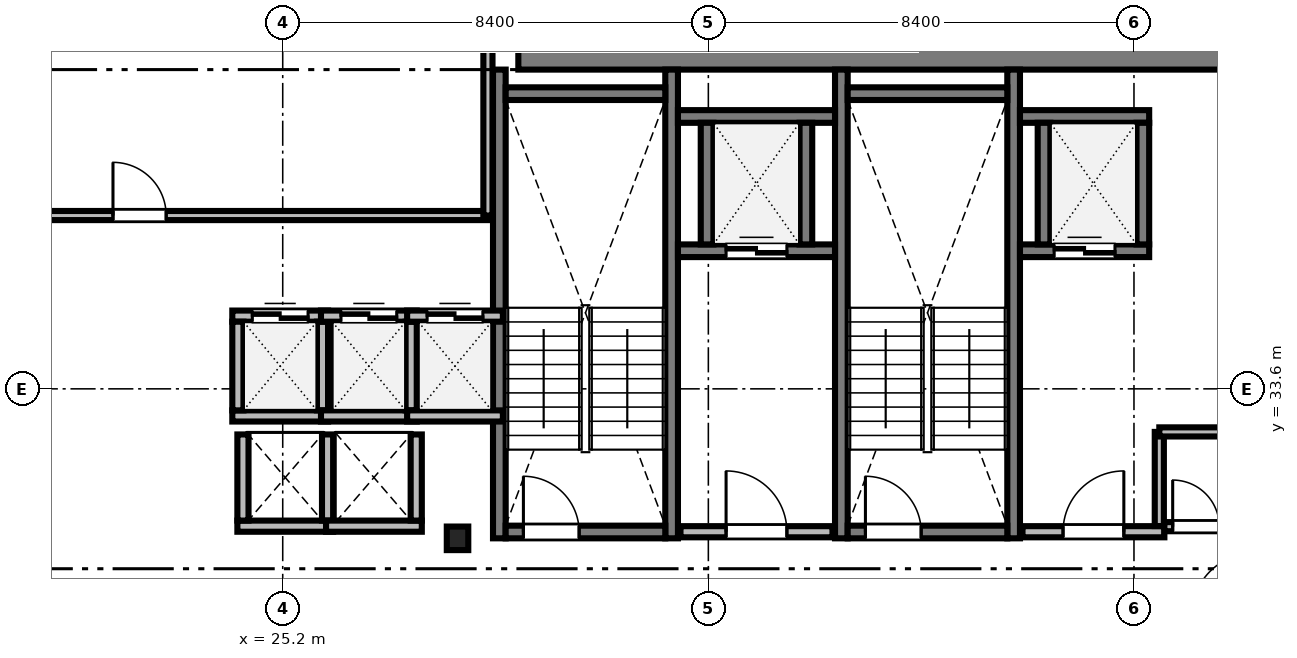
"""IFC4 building model, lengths in metres.
Left out: names, types, materials, properties, quantities, classifications, styles, units other than length and angle.
Written with IfcOpenShell. Run it as: python <this file> out.ifc"""

import sys

from ifc_helpers import new_model, si_unit, direction, frame, frame_2d, origin, origin_2d, place, context, subcontext, project, spatial, rectangle, i_section, extrude, source, transform, mapped, element, fill, save


model = new_model("IFC4")
c1 = context("Model", 3, precision=1e-05, world=origin(), true_north=direction((0.0, 1.0)))
c2 = subcontext(c1, "Body", "Model", "MODEL_VIEW")
j1 = project(units=[si_unit("LENGTHUNIT", "METRE"), si_unit("PLANEANGLEUNIT", "RADIAN")], contexts=[c1])
p1 = place(None, origin())
s1 = spatial("IfcSite", under=j1, at=p1, CompositionType="ELEMENT")
p2 = place(p1, origin())
s2 = spatial("IfcBuilding", under=s1, at=p2, CompositionType="ELEMENT")
p3 = place(p2, frame((0.0, 0.0, 126.1)))
s3 = spatial("IfcBuildingStorey", under=s2, at=p3, CompositionType="ELEMENT", Elevation=126.1)
m1 = source(origin(), c2, "Body", "SweptSolid", [
    extrude(rectangle(XDim=17.52, YDim=0.8, at=frame_2d((8.76, 0.0))), origin(), (0.0, 0.0, 1.0), 3.46),
])
p4 = place(p3, frame((29.85, 40.3, 0.0), z_axis=(0.0, 0.0, 1.0), x_axis=(1.0, 0.0, 0.0)))
e1 = element("IfcWall", 1, at=p4, inside=s3, PredefinedType="SHEAR", context=c2, shape_type="MappedRepresentation", body=[
    mapped(m1, transform((0.0, 0.0, 0.0), scale=1.0)),
])
m2 = source(origin(), c2, "Body", "SweptSolid", [
    extrude(i_section(OverallWidth=0.424, OverallDepth=0.465, WebThickness=0.035, FlangeThickness=0.056, FilletRadius=0.015, at=origin_2d()), origin(), (0.0, 0.0, 1.0), 3.46),
])
p5 = place(p3, frame((28.65, 30.65, 0.0), z_axis=(0.0, 0.0, 1.0), x_axis=(1.0, 0.0, 0.0)))
e2 = element("IfcColumn", 2, at=p5, inside=s3, PredefinedType="COLUMN", context=c2, shape_type="MappedRepresentation", body=[
    mapped(m2, transform((0.0, 0.0, 0.0), scale=1.0)),
])
m3 = source(origin(), c2, "Body", "SweptSolid", [
    extrude(rectangle(XDim=9.25, YDim=0.25, at=frame_2d((4.625, 0.0))), origin(), (0.0, 0.0, 1.0), 3.5),
])
for number, where, z_axis, x_axis in (
    (3, (29.475, 30.65, 0.0), (0.0, 0.0, 1.0), (0.0, 1.0, 0.0)),
    (4, (32.875, 30.65, 0.0), (0.0, 0.0, 1.0), (0.0, 1.0, 0.0)),
):
    element("IfcWall", number, at=place(p3, frame(where, z_axis=z_axis, x_axis=x_axis)), inside=s3, PredefinedType="SOLIDWALL", context=c2, shape_type="MappedRepresentation", body=[
        mapped(m3, transform((0.0, 0.0, 0.0), scale=1.0)),
    ])
m4 = source(origin(), c2, "Body", "SweptSolid", [
    extrude(rectangle(XDim=3.15, YDim=0.25, at=frame_2d((1.575, 0.0))), origin(), (0.0, 0.0, 1.0), 3.5),
])
p6 = place(p3, frame((29.6, 39.425, 0.0), z_axis=(0.0, 0.0, 1.0), x_axis=(1.0, 0.0, 0.0)))
e5 = element("IfcWall", 5, at=p6, inside=s3, PredefinedType="SOLIDWALL", context=c2, shape_type="MappedRepresentation", body=[
    mapped(m4, transform((0.0, 0.0, 0.0), scale=1.0)),
])
p7 = place(p3, frame((29.6, 30.775, 0.0), z_axis=(0.0, 0.0, 1.0), x_axis=(1.0, 0.0, 0.0)))
e6 = element("IfcWall", 6, at=p7, inside=s3, PredefinedType="SOLIDWALL", context=c2, shape_type="MappedRepresentation", body=[
    mapped(m4, transform((0.0, 0.0, 0.0), scale=1.0)),
])
m5 = source(origin(), c2, "Body", "SweptSolid", [
    extrude(rectangle(XDim=1.1, YDim=2.2, at=frame_2d((0.55, 1.1))), frame((0.0, 0.135, 0.0), z_axis=(0.0, -1.0, 0.0), x_axis=(1.0, 0.0, 0.0)), (0.0, 0.0, 1.0), 0.27),
])
p8 = place(p7, frame((0.35, 0.0, 0.0)))
e7 = element("IfcOpeningElement", 7, at=p8, cuts=e6, PredefinedType="OPENING", context=c2, shape_type="MappedRepresentation", body=[
    mapped(m5, transform((0.0, 0.0, 0.0), scale=1.0)),
])
for number, where, z_axis, x_axis in (
    (8, (36.225, 30.65, 0.0), (0.0, 0.0, 1.0), (0.0, 1.0, 0.0)),
    (9, (39.625, 30.65, 0.0), (0.0, 0.0, 1.0), (0.0, 1.0, 0.0)),
):
    element("IfcWall", number, at=place(p3, frame(where, z_axis=z_axis, x_axis=x_axis)), inside=s3, PredefinedType="SOLIDWALL", context=c2, shape_type="MappedRepresentation", body=[
        mapped(m3, transform((0.0, 0.0, 0.0), scale=1.0)),
    ])
p9 = place(p3, frame((36.35, 39.425, 0.0), z_axis=(0.0, 0.0, 1.0), x_axis=(1.0, 0.0, 0.0)))
e10 = element("IfcWall", 10, at=p9, inside=s3, PredefinedType="SOLIDWALL", context=c2, shape_type="MappedRepresentation", body=[
    mapped(m4, transform((0.0, 0.0, 0.0), scale=1.0)),
])
p10 = place(p3, frame((36.35, 30.775, 0.0), z_axis=(0.0, 0.0, 1.0), x_axis=(1.0, 0.0, 0.0)))
e11 = element("IfcWall", 11, at=p10, inside=s3, PredefinedType="SOLIDWALL", context=c2, shape_type="MappedRepresentation", body=[
    mapped(m4, transform((0.0, 0.0, 0.0), scale=1.0)),
])
p11 = place(p10, frame((0.35, 0.0, 0.0)))
e12 = element("IfcOpeningElement", 12, at=p11, cuts=e11, PredefinedType="OPENING", context=c2, shape_type="MappedRepresentation", body=[
    mapped(m5, transform((0.0, 0.0, 0.0), scale=1.0)),
])
m6 = source(origin(), c2, "Body", "SweptSolid", [
    extrude(rectangle(XDim=3.0, YDim=0.22, at=frame_2d((1.5, 0.0))), origin(), (0.0, 0.0, 1.0), 3.46),
])
p12 = place(p3, frame((33.05, 30.78, 0.0), z_axis=(0.0, 0.0, 1.0), x_axis=(1.0, 0.0, 0.0)))
e13 = element("IfcWall", 13, at=p12, inside=s3, PredefinedType="SOLIDWALL", context=c2, shape_type="MappedRepresentation", body=[
    mapped(m6, transform((0.0, 0.0, 0.0), scale=1.0)),
])
m7 = source(origin(), c2, "Body", "SweptSolid", [
    extrude(rectangle(XDim=1.2, YDim=2.2, at=frame_2d((0.6, 1.1))), frame((0.0, 0.12, 0.0), z_axis=(0.0, -1.0, 0.0), x_axis=(1.0, 0.0, 0.0)), (0.0, 0.0, 1.0), 0.24),
])
p13 = place(p12, frame((0.9, 0.0, 0.0)))
e14 = element("IfcOpeningElement", 14, at=p13, cuts=e13, PredefinedType="OPENING", context=c2, shape_type="MappedRepresentation", body=[
    mapped(m7, transform((0.0, 0.0, 0.0), scale=1.0)),
])
m8 = source(origin(), c2, "Body", "SweptSolid", [
    extrude(rectangle(XDim=2.8, YDim=0.22, at=frame_2d((1.4, 0.0))), origin(), (0.0, 0.0, 1.0), 3.46),
])
p14 = place(p3, frame((39.8, 30.78, 0.0), z_axis=(0.0, 0.0, 1.0), x_axis=(1.0, 0.0, 0.0)))
e15 = element("IfcWall", 15, at=p14, inside=s3, PredefinedType="SOLIDWALL", context=c2, shape_type="MappedRepresentation", body=[
    mapped(m8, transform((0.0, 0.0, 0.0), scale=1.0)),
])
p15 = place(p14, frame((0.8, 0.0, 0.0)))
e16 = element("IfcOpeningElement", 16, at=p15, cuts=e15, PredefinedType="OPENING", context=c2, shape_type="MappedRepresentation", body=[
    mapped(m7, transform((0.0, 0.0, 0.0), scale=1.0)),
])
m9 = source(origin(), c2, "Body", "SweptSolid", [
    extrude(rectangle(XDim=1.89, YDim=0.22, at=frame_2d((0.945, 0.0))), origin(), (0.0, 0.0, 1.0), 3.46),
])
p16 = place(p3, frame((24.205, 33.065, 0.0), z_axis=(0.0, 0.0, 1.0), x_axis=(1.0, 0.0, 0.0)))
e17 = element("IfcWall", 17, at=p16, inside=s3, PredefinedType="SOLIDWALL", context=c2, shape_type="MappedRepresentation", body=[
    mapped(m9, transform((0.0, 0.0, 0.0), scale=1.0)),
])
p17 = place(p3, frame((24.205, 35.035, 0.0), z_axis=(0.0, 0.0, 1.0), x_axis=(1.0, 0.0, 0.0)))
e18 = element("IfcWall", 18, at=p17, inside=s3, PredefinedType="SOLIDWALL", context=c2, shape_type="MappedRepresentation", body=[
    mapped(m9, transform((0.0, 0.0, 0.0), scale=1.0)),
])
m10 = source(origin(), c2, "Body", "SweptSolid", [
    extrude(rectangle(XDim=1.1, YDim=2.2, at=frame_2d((0.55, 1.1))), frame((0.0, 0.12, 0.0), z_axis=(0.0, -1.0, 0.0), x_axis=(1.0, 0.0, 0.0)), (0.0, 0.0, 1.0), 0.24),
])
p18 = place(p17, frame((0.395, 0.0, 0.0)))
e19 = element("IfcOpeningElement", 19, at=p18, cuts=e18, PredefinedType="OPENING", context=c2, shape_type="MappedRepresentation", body=[
    mapped(m10, transform((0.0, 0.0, 0.0), scale=1.0)),
])
m11 = source(origin(), c2, "Body", "SweptSolid", [
    extrude(rectangle(XDim=1.75, YDim=0.22, at=frame_2d((0.875, 0.0))), origin(), (0.0, 0.0, 1.0), 3.46),
])
for number, where, z_axis, x_axis in (
    (20, (24.315, 33.175, 0.0), (0.0, 0.0, 1.0), (0.0, 1.0, 0.0)),
    (21, (25.985, 33.175, 0.0), (0.0, 0.0, 1.0), (0.0, 1.0, 0.0)),
):
    element("IfcWall", number, at=place(p3, frame(where, z_axis=z_axis, x_axis=x_axis)), inside=s3, PredefinedType="SOLIDWALL", context=c2, shape_type="MappedRepresentation", body=[
        mapped(m11, transform((0.0, 0.0, 0.0), scale=1.0)),
    ])
p19 = place(p3, frame((25.955, 33.065, 0.0), z_axis=(0.0, 0.0, 1.0), x_axis=(1.0, 0.0, 0.0)))
e22 = element("IfcWall", 22, at=p19, inside=s3, PredefinedType="SOLIDWALL", context=c2, shape_type="MappedRepresentation", body=[
    mapped(m9, transform((0.0, 0.0, 0.0), scale=1.0)),
])
p20 = place(p3, frame((25.955, 35.035, 0.0), z_axis=(0.0, 0.0, 1.0), x_axis=(1.0, 0.0, 0.0)))
e23 = element("IfcWall", 23, at=p20, inside=s3, PredefinedType="SOLIDWALL", context=c2, shape_type="MappedRepresentation", body=[
    mapped(m9, transform((0.0, 0.0, 0.0), scale=1.0)),
])
p21 = place(p20, frame((0.395, 0.0, 0.0)))
e24 = element("IfcOpeningElement", 24, at=p21, cuts=e23, PredefinedType="OPENING", context=c2, shape_type="MappedRepresentation", body=[
    mapped(m10, transform((0.0, 0.0, 0.0), scale=1.0)),
])
p22 = place(p3, frame((27.735, 33.175, 0.0), z_axis=(0.0, 0.0, 1.0), x_axis=(0.0, 1.0, 0.0)))
e25 = element("IfcWall", 25, at=p22, inside=s3, PredefinedType="SOLIDWALL", context=c2, shape_type="MappedRepresentation", body=[
    mapped(m11, transform((0.0, 0.0, 0.0), scale=1.0)),
])
p23 = place(p3, frame((27.655, 33.065, 0.0), z_axis=(0.0, 0.0, 1.0), x_axis=(1.0, 0.0, 0.0)))
e26 = element("IfcWall", 26, at=p23, inside=s3, PredefinedType="SOLIDWALL", context=c2, shape_type="MappedRepresentation", body=[
    mapped(m9, transform((0.0, 0.0, 0.0), scale=1.0)),
])
p24 = place(p3, frame((27.655, 35.035, 0.0), z_axis=(0.0, 0.0, 1.0), x_axis=(1.0, 0.0, 0.0)))
e27 = element("IfcWall", 27, at=p24, inside=s3, PredefinedType="SOLIDWALL", context=c2, shape_type="MappedRepresentation", body=[
    mapped(m9, transform((0.0, 0.0, 0.0), scale=1.0)),
])
p25 = place(p24, frame((0.395, 0.0, 0.0)))
e28 = element("IfcOpeningElement", 28, at=p25, cuts=e27, PredefinedType="OPENING", context=c2, shape_type="MappedRepresentation", body=[
    mapped(m10, transform((0.0, 0.0, 0.0), scale=1.0)),
])
m12 = source(origin(), c2, "Body", "SweptSolid", [
    extrude(rectangle(XDim=3.1, YDim=0.25, at=frame_2d((1.55, 0.0))), origin(), (0.0, 0.0, 1.0), 3.46),
])
p26 = place(p3, frame((33.0, 36.325, 0.0), z_axis=(0.0, 0.0, 1.0), x_axis=(1.0, 0.0, 0.0)))
e29 = element("IfcWall", 29, at=p26, inside=s3, PredefinedType="SOLIDWALL", context=c2, shape_type="MappedRepresentation", body=[
    mapped(m12, transform((0.0, 0.0, 0.0), scale=1.0)),
])
m13 = source(origin(), c2, "Body", "SweptSolid", [
    extrude(rectangle(XDim=1.2, YDim=2.25, at=frame_2d((0.6, 1.125))), frame((0.0, 0.135, 0.0), z_axis=(0.0, -1.0, 0.0), x_axis=(1.0, 0.0, 0.0)), (0.0, 0.0, 1.0), 0.27),
])
p27 = place(p26, frame((0.95, 0.0, 0.0)))
e30 = element("IfcOpeningElement", 30, at=p27, cuts=e29, PredefinedType="OPENING", context=c2, shape_type="MappedRepresentation", body=[
    mapped(m13, transform((0.0, 0.0, 0.0), scale=1.0)),
])
p28 = place(p3, frame((33.0, 38.975, 0.0), z_axis=(0.0, 0.0, 1.0), x_axis=(1.0, 0.0, 0.0)))
e31 = element("IfcWall", 31, at=p28, inside=s3, PredefinedType="SOLIDWALL", context=c2, shape_type="MappedRepresentation", body=[
    mapped(m12, transform((0.0, 0.0, 0.0), scale=1.0)),
])
m14 = source(origin(), c2, "Body", "SweptSolid", [
    extrude(rectangle(XDim=2.4, YDim=0.25, at=frame_2d((1.2, 0.0))), origin(), (0.0, 0.0, 1.0), 3.46),
])
for number, where, z_axis, x_axis in (
    (32, (33.575, 36.45, 0.0), (0.0, 0.0, 1.0), (0.0, 1.0, 0.0)),
    (33, (35.525, 36.45, 0.0), (0.0, 0.0, 1.0), (0.0, 1.0, 0.0)),
):
    element("IfcWall", number, at=place(p3, frame(where, z_axis=z_axis, x_axis=x_axis)), inside=s3, PredefinedType="SOLIDWALL", context=c2, shape_type="MappedRepresentation", body=[
        mapped(m14, transform((0.0, 0.0, 0.0), scale=1.0)),
    ])
m15 = source(origin(), c2, "Body", "SweptSolid", [
    extrude(rectangle(XDim=2.55, YDim=0.25, at=frame_2d((1.275, 0.0))), origin(), (0.0, 0.0, 1.0), 3.46),
])
p29 = place(p3, frame((39.75, 36.325, 0.0), z_axis=(0.0, 0.0, 1.0), x_axis=(1.0, 0.0, 0.0)))
e34 = element("IfcWall", 34, at=p29, inside=s3, PredefinedType="SOLIDWALL", context=c2, shape_type="MappedRepresentation", body=[
    mapped(m15, transform((0.0, 0.0, 0.0), scale=1.0)),
])
p30 = place(p29, frame((0.675, 0.0, 0.0)))
e35 = element("IfcOpeningElement", 35, at=p30, cuts=e34, PredefinedType="OPENING", context=c2, shape_type="MappedRepresentation", body=[
    mapped(m13, transform((0.0, 0.0, 0.0), scale=1.0)),
])
p31 = place(p3, frame((39.75, 38.975, 0.0), z_axis=(0.0, 0.0, 1.0), x_axis=(1.0, 0.0, 0.0)))
e36 = element("IfcWall", 36, at=p31, inside=s3, PredefinedType="SOLIDWALL", context=c2, shape_type="MappedRepresentation", body=[
    mapped(m15, transform((0.0, 0.0, 0.0), scale=1.0)),
])
for number, where, z_axis, x_axis in (
    (37, (40.225, 36.45, 0.0), (0.0, 0.0, 1.0), (0.0, 1.0, 0.0)),
    (38, (42.175, 36.45, 0.0), (0.0, 0.0, 1.0), (0.0, 1.0, 0.0)),
):
    element("IfcWall", number, at=place(p3, frame(where, z_axis=z_axis, x_axis=x_axis)), inside=s3, PredefinedType="SOLIDWALL", context=c2, shape_type="MappedRepresentation", body=[
        mapped(m14, transform((0.0, 0.0, 0.0), scale=1.0)),
    ])
m16 = source(origin(), c2, "Body", "SweptSolid", [
    extrude(rectangle(XDim=1.89, YDim=0.22, at=frame_2d((0.945, 0.0))), origin(), (0.0, 0.0, 1.0), 3.46),
])
p32 = place(p3, frame((24.305, 30.89, 0.0), z_axis=(0.0, 0.0, 1.0), x_axis=(1.0, 0.0, 0.0)))
e39 = element("IfcWall", 39, at=p32, inside=s3, PredefinedType="SOLIDWALL", context=c2, shape_type="MappedRepresentation", body=[
    mapped(m16, transform((0.0, 0.0, 0.0), scale=1.0)),
])
m17 = source(origin(), c2, "Body", "SweptSolid", [
    extrude(rectangle(XDim=1.7, YDim=0.22, at=frame_2d((0.85, 0.0))), origin(), (0.0, 0.0, 1.0), 3.46),
])
for number, where, z_axis, x_axis in (
    (40, (24.415, 31.0, 0.0), (0.0, 0.0, 1.0), (0.0, 1.0, 0.0)),
    (41, (26.085, 31.0, 0.0), (0.0, 0.0, 1.0), (0.0, 1.0, 0.0)),
):
    element("IfcWall", number, at=place(p3, frame(where, z_axis=z_axis, x_axis=x_axis)), inside=s3, PredefinedType="SOLIDWALL", context=c2, shape_type="MappedRepresentation", body=[
        mapped(m17, transform((0.0, 0.0, 0.0), scale=1.0)),
    ])
p33 = place(p3, frame((26.055, 30.89, 0.0), z_axis=(0.0, 0.0, 1.0), x_axis=(1.0, 0.0, 0.0)))
e42 = element("IfcWall", 42, at=p33, inside=s3, PredefinedType="SOLIDWALL", context=c2, shape_type="MappedRepresentation", body=[
    mapped(m16, transform((0.0, 0.0, 0.0), scale=1.0)),
])
p34 = place(p3, frame((27.835, 31.0, 0.0), z_axis=(0.0, 0.0, 1.0), x_axis=(0.0, 1.0, 0.0)))
e43 = element("IfcWall", 43, at=p34, inside=s3, PredefinedType="SOLIDWALL", context=c2, shape_type="MappedRepresentation", body=[
    mapped(m17, transform((0.0, 0.0, 0.0), scale=1.0)),
])
m18 = source(origin(), c2, "Body", "SweptSolid", [
    extrude(rectangle(XDim=22.328, YDim=0.18, at=frame_2d((11.164, 0.0))), origin(), (0.0, 0.0, 1.0), 2.702),
])
p35 = place(p3, frame((6.922, 37.02, 0.0), z_axis=(0.0, 0.0, 1.0), x_axis=(1.0, 0.0, 0.0)))
e44 = element("IfcWall", 44, at=p35, inside=s3, PredefinedType="PARTITIONING", context=c2, shape_type="MappedRepresentation", body=[
    mapped(m18, transform((0.0, 0.0, 0.0), scale=1.0)),
])
m19 = source(origin(), c2, "Body", "SweptSolid", [
    extrude(rectangle(XDim=1.05, YDim=2.2, at=frame_2d((0.525, 1.1))), frame((0.0, 0.1, 0.0), z_axis=(0.0, -1.0, 0.0), x_axis=(1.0, 0.0, 0.0)), (0.0, 0.0, 1.0), 0.2),
])
p36 = place(p35, frame((14.928, 0.0, 0.0)))
e45 = element("IfcOpeningElement", 45, at=p36, cuts=e44, PredefinedType="OPENING", context=c2, shape_type="MappedRepresentation", body=[
    mapped(m19, transform((0.0, 0.0, 0.0), scale=1.0)),
])
m20 = source(origin(), c2, "Body", "SweptSolid", [
    extrude(rectangle(XDim=1.248, YDim=0.18, at=frame_2d((0.624, 0.0))), origin(), (0.0, 0.0, 1.0), 3.46),
])
p37 = place(p3, frame((42.6, 30.88, 0.0), z_axis=(0.0, 0.0, 1.0), x_axis=(1.0, 0.0, 0.0)))
e46 = element("IfcWall", 46, at=p37, inside=s3, PredefinedType="PARTITIONING", context=c2, shape_type="MappedRepresentation", body=[
    mapped(m20, transform((0.0, 0.0, 0.0), scale=1.0)),
])
m21 = source(origin(), c2, "Body", "SweptSolid", [
    extrude(rectangle(XDim=0.92, YDim=2.1, at=frame_2d((0.46, 1.05))), frame((0.0, 0.1, 0.0), z_axis=(0.0, -1.0, 0.0), x_axis=(1.0, 0.0, 0.0)), (0.0, 0.0, 1.0), 0.2),
])
p38 = place(p37, frame((0.164, 0.0, 0.0)))
e47 = element("IfcOpeningElement", 47, at=p38, cuts=e46, PredefinedType="OPENING", context=c2, shape_type="MappedRepresentation", body=[
    mapped(m21, transform((0.0, 0.0, 0.0), scale=1.0)),
])
m22 = source(origin(), c2, "Body", "SweptSolid", [
    extrude(rectangle(XDim=11.45, YDim=0.18, at=frame_2d((5.725, 0.0))), origin(), (0.0, 0.0, 1.0), 2.702),
])
p39 = place(p3, frame((29.25, 37.02, 0.0), z_axis=(0.0, 0.0, 1.0), x_axis=(0.0, 1.0, 0.0)))
e48 = element("IfcWall", 48, at=p39, inside=s3, PredefinedType="PARTITIONING", context=c2, shape_type="MappedRepresentation", body=[
    mapped(m22, transform((0.0, 0.0, 0.0), scale=1.0)),
])
m23 = source(origin(), c2, "Body", "SweptSolid", [
    extrude(rectangle(XDim=1.858, YDim=0.18, at=frame_2d((0.929, 0.0))), origin(), (0.0, 0.0, 1.0), 3.46),
])
p40 = place(p3, frame((42.5, 30.892, 0.0), z_axis=(0.0, 0.0, 1.0), x_axis=(0.0, 1.0, 0.0)))
e49 = element("IfcWall", 49, at=p40, inside=s3, PredefinedType="PARTITIONING", context=c2, shape_type="MappedRepresentation", body=[
    mapped(m23, transform((0.0, 0.0, 0.0), scale=1.0)),
])
m24 = source(origin(), c2, "Body", "SweptSolid", [
    extrude(rectangle(XDim=1.348, YDim=0.18, at=frame_2d((0.674, 0.0))), origin(), (0.0, 0.0, 1.0), 3.46),
])
p41 = place(p3, frame((42.5, 32.75, 0.0), z_axis=(0.0, 0.0, 1.0), x_axis=(1.0, 0.0, 0.0)))
e50 = element("IfcWall", 50, at=p41, inside=s3, PredefinedType="PARTITIONING", context=c2, shape_type="MappedRepresentation", body=[
    mapped(m24, transform((0.0, 0.0, 0.0), scale=1.0)),
])
m25 = source(origin(), c2, "Body", "SweptSolid", [
    extrude(rectangle(XDim=1.1, YDim=2.2, at=frame_2d((0.55, 1.1))), frame((0.0, 0.025, 0.0), z_axis=(0.0, -1.0, 0.0), x_axis=(1.0, 0.0, 0.0)), (0.0, 0.0, 1.0), 0.05),
])
p42 = place(p8, origin())
e51 = element("IfcDoor", 51, at=p42, inside=s3, OperationType="SINGLE_SWING_LEFT", PredefinedType="DOOR", context=c2, shape_type="MappedRepresentation", body=[
    mapped(m25, transform((0.0, 0.0, 0.0), scale=1.0)),
])
fill(e7, e51)
p43 = place(p11, origin())
e52 = element("IfcDoor", 52, at=p43, inside=s3, OperationType="SINGLE_SWING_LEFT", PredefinedType="DOOR", context=c2, shape_type="MappedRepresentation", body=[
    mapped(m25, transform((0.0, 0.0, 0.0), scale=1.0)),
])
fill(e12, e52)
m26 = source(origin(), c2, "Body", "SweptSolid", [
    extrude(rectangle(XDim=1.2, YDim=2.2, at=frame_2d((0.6, 1.1))), frame((0.0, 0.025, 0.0), z_axis=(0.0, -1.0, 0.0), x_axis=(1.0, 0.0, 0.0)), (0.0, 0.0, 1.0), 0.05),
])
p44 = place(p13, origin())
e53 = element("IfcDoor", 53, at=p44, inside=s3, OperationType="SINGLE_SWING_LEFT", PredefinedType="DOOR", context=c2, shape_type="MappedRepresentation", body=[
    mapped(m26, transform((0.0, 0.0, 0.0), scale=1.0)),
])
fill(e14, e53)
p45 = place(p15, origin())
e54 = element("IfcDoor", 54, at=p45, inside=s3, OperationType="SINGLE_SWING_RIGHT", PredefinedType="DOOR", context=c2, shape_type="MappedRepresentation", body=[
    mapped(m26, transform((0.0, 0.0, 0.0), scale=1.0)),
])
fill(e16, e54)
p46 = place(p18, origin())
e55 = element("IfcDoor", 55, at=p46, inside=s3, OperationType="DOUBLE_DOOR_SLIDING", PredefinedType="DOOR", context=c2, shape_type="MappedRepresentation", body=[
    mapped(m25, transform((0.0, 0.0, 0.0), scale=1.0)),
])
fill(e19, e55)
p47 = place(p21, origin())
e56 = element("IfcDoor", 56, at=p47, inside=s3, OperationType="DOUBLE_DOOR_SLIDING", PredefinedType="DOOR", context=c2, shape_type="MappedRepresentation", body=[
    mapped(m25, transform((0.0, 0.0, 0.0), scale=1.0)),
])
fill(e24, e56)
p48 = place(p25, origin())
e57 = element("IfcDoor", 57, at=p48, inside=s3, OperationType="DOUBLE_DOOR_SLIDING", PredefinedType="DOOR", context=c2, shape_type="MappedRepresentation", body=[
    mapped(m25, transform((0.0, 0.0, 0.0), scale=1.0)),
])
fill(e28, e57)
m27 = source(origin(), c2, "Body", "SweptSolid", [
    extrude(rectangle(XDim=1.2, YDim=2.25, at=frame_2d((0.6, 1.125))), frame((0.0, 0.025, 0.0), z_axis=(0.0, -1.0, 0.0), x_axis=(1.0, 0.0, 0.0)), (0.0, 0.0, 1.0), 0.05),
])
p49 = place(p27, origin())
e58 = element("IfcDoor", 58, at=p49, inside=s3, OperationType="DOUBLE_DOOR_SLIDING", PredefinedType="DOOR", context=c2, shape_type="MappedRepresentation", body=[
    mapped(m27, transform((0.0, 0.0, 0.0), scale=1.0)),
])
fill(e30, e58)
p50 = place(p30, origin())
e59 = element("IfcDoor", 59, at=p50, inside=s3, OperationType="DOUBLE_DOOR_SLIDING", PredefinedType="DOOR", context=c2, shape_type="MappedRepresentation", body=[
    mapped(m27, transform((0.0, 0.0, 0.0), scale=1.0)),
])
fill(e35, e59)
m28 = source(origin(), c2, "Body", "SweptSolid", [
    extrude(rectangle(XDim=1.05, YDim=2.2, at=frame_2d((0.525, 1.1))), frame((0.0, 0.025, 0.0), z_axis=(0.0, -1.0, 0.0), x_axis=(1.0, 0.0, 0.0)), (0.0, 0.0, 1.0), 0.05),
])
p51 = place(p36, origin())
e60 = element("IfcDoor", 60, at=p51, inside=s3, OperationType="SINGLE_SWING_LEFT", PredefinedType="DOOR", context=c2, shape_type="MappedRepresentation", body=[
    mapped(m28, transform((0.0, 0.0, 0.0), scale=1.0)),
])
fill(e45, e60)
m29 = source(origin(), c2, "Body", "SweptSolid", [
    extrude(rectangle(XDim=0.92, YDim=2.1, at=frame_2d((0.46, 1.05))), frame((0.0, 0.025, 0.0), z_axis=(0.0, -1.0, 0.0), x_axis=(1.0, 0.0, 0.0)), (0.0, 0.0, 1.0), 0.05),
])
p52 = place(p38, origin())
e61 = element("IfcDoor", 61, at=p52, inside=s3, OperationType="SINGLE_SWING_LEFT", PredefinedType="DOOR", context=c2, shape_type="MappedRepresentation", body=[
    mapped(m29, transform((0.0, 0.0, 0.0), scale=1.0)),
])
fill(e47, e61)
save(model, sys.argv[1])
